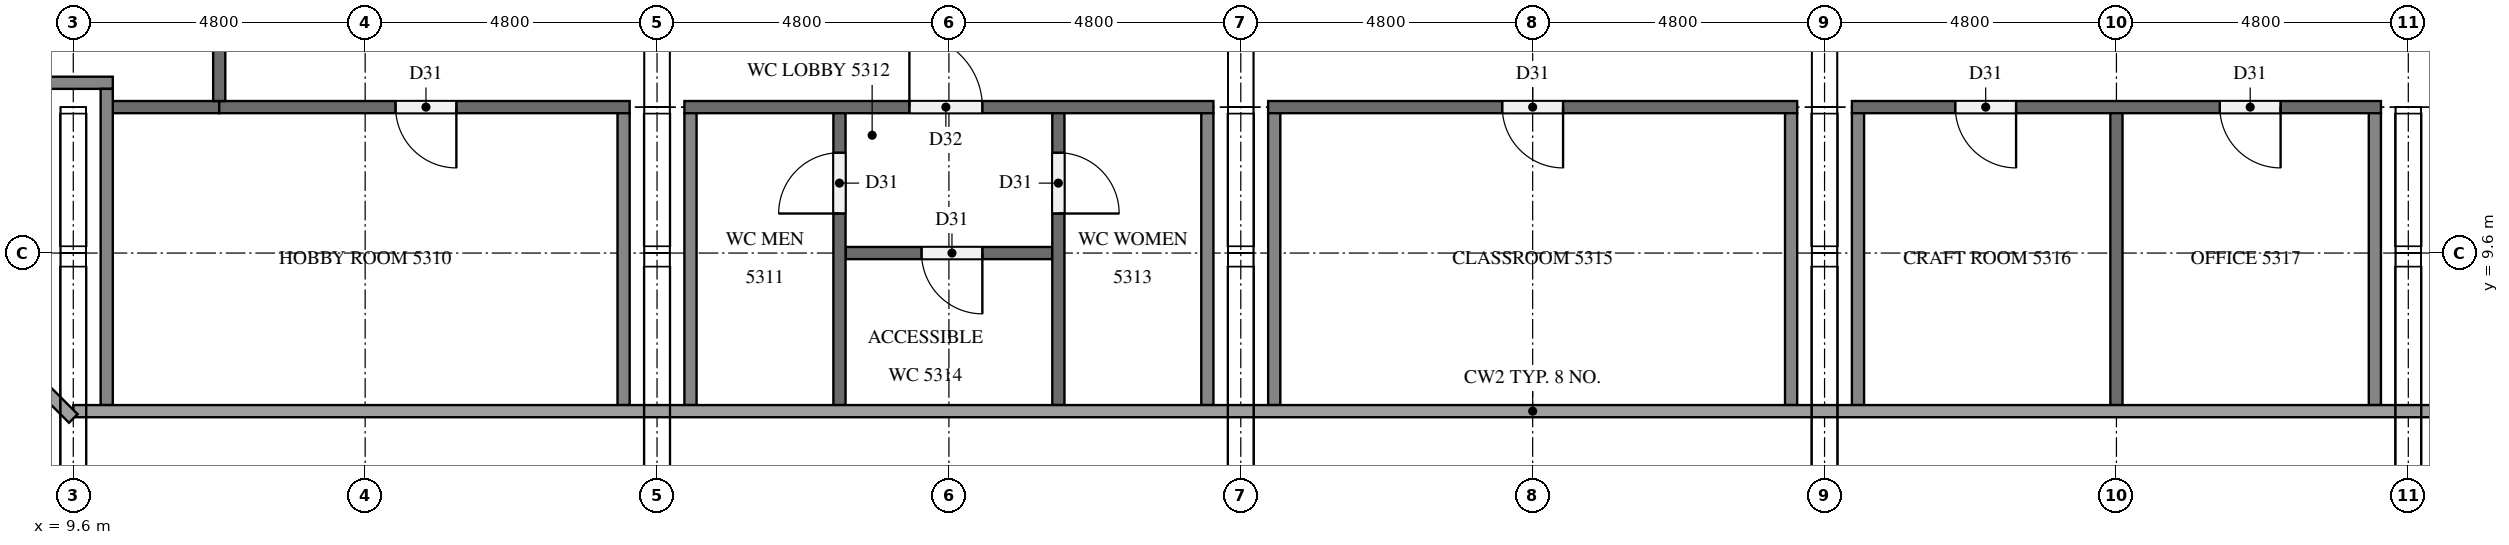
"""IFC4 building model, lengths in metres.
Left out: names, types, materials, properties, quantities, classifications, styles, units other than length and angle.
Written with IfcOpenShell. Run it as: python <this file> out.ifc"""

import sys

from ifc_helpers import new_model, si_unit, direction, frame, frame_2d, origin, place, context, subcontext, project, spatial, rectangle, extrude, element, fill, save


model = new_model("IFC4")
c1 = context("Model", 3, precision=1e-05, world=origin(), true_north=direction((0.0, 1.0)))
c2 = subcontext(c1, "Body", "Model", "MODEL_VIEW")
j1 = project(units=[si_unit("LENGTHUNIT", "METRE"), si_unit("PLANEANGLEUNIT", "RADIAN")], contexts=[c1])
p1 = place(None, origin())
s1 = spatial("IfcSite", under=j1, at=p1, CompositionType="ELEMENT")
p2 = place(p1, origin())
s2 = spatial("IfcBuilding", under=s1, at=p2, CompositionType="ELEMENT")
p3 = place(p2, frame((0.0, 0.0, 203.4)))
s3 = spatial("IfcBuildingStorey", under=s2, at=p3, CompositionType="ELEMENT", Elevation=203.4)
p4 = place(p3, frame((25.7, 9.6, 0.0), z_axis=(0.0, 0.0, 1.0), x_axis=(-1.0, 0.0, 0.0)))
e1 = element("IfcWall", 1, at=p4, inside=s3, PredefinedType="PARTITIONING", context=c2, shape_type="SweptSolid", body=[
    extrude(rectangle(XDim=3.4, YDim=0.2, at=frame_2d((1.7, 0.0))), origin(), (0.0, 0.0, 1.0), 5.1),
])
p5 = place(p4, frame((1.15, 0.0, 0.0)))
e2 = element("IfcOpeningElement", 2, at=p5, cuts=e1, PredefinedType="OPENING", context=c2, shape_type="SweptSolid", body=[
    extrude(rectangle(XDim=1.0, YDim=2.1, at=frame_2d((0.5, 1.05))), frame((0.0, 0.11, 0.0), z_axis=(0.0, -1.0, 0.0), x_axis=(1.0, 0.0, 0.0)), (0.0, 0.0, 1.0), 0.22),
])
p6 = place(p3, frame((10.25, 12.0, 0.0), z_axis=(0.0, 0.0, 1.0), x_axis=(1.0, 0.0, 0.0)))
e3 = element("IfcWall", 3, at=p6, inside=s3, PredefinedType="PARTITIONING", context=c2, shape_type="SweptSolid", body=[
    extrude(rectangle(XDim=1.75, YDim=0.2, at=frame_2d((0.875, 0.0))), origin(), (0.0, 0.0, 1.0), 5.1),
])
p7 = place(p3, frame((18.75, 12.0, 0.0), z_axis=(0.0, 0.0, 1.0), x_axis=(-1.0, 0.0, 0.0)))
e4 = element("IfcWall", 4, at=p7, inside=s3, PredefinedType="PARTITIONING", context=c2, shape_type="SweptSolid", body=[
    extrude(rectangle(XDim=6.75, YDim=0.2, at=frame_2d((3.375, 0.0))), origin(), (0.0, 0.0, 1.0), 5.1),
])
p8 = place(p7, frame((2.85, 0.0, 0.0)))
e5 = element("IfcOpeningElement", 5, at=p8, cuts=e4, PredefinedType="OPENING", context=c2, shape_type="SweptSolid", body=[
    extrude(rectangle(XDim=1.0, YDim=2.1, at=frame_2d((0.5, 1.05))), frame((0.0, 0.11, 0.0), z_axis=(0.0, -1.0, 0.0), x_axis=(1.0, 0.0, 0.0)), (0.0, 0.0, 1.0), 0.22),
])
p9 = place(p3, frame((19.65, 12.0, 0.0), z_axis=(0.0, 0.0, 1.0), x_axis=(1.0, 0.0, 0.0)))
e6 = element("IfcWall", 6, at=p9, inside=s3, PredefinedType="PARTITIONING", context=c2, shape_type="SweptSolid", body=[
    extrude(rectangle(XDim=8.7, YDim=0.2, at=frame_2d((4.35, 0.0))), origin(), (0.0, 0.0, 1.0), 5.1),
])
p10 = place(p9, frame((3.7, 0.0, 0.0)))
e7 = element("IfcOpeningElement", 7, at=p10, cuts=e6, PredefinedType="OPENING", context=c2, shape_type="SweptSolid", body=[
    extrude(rectangle(XDim=1.2, YDim=2.1, at=frame_2d((0.6, 1.05))), frame((0.0, 0.11, 0.0), z_axis=(0.0, -1.0, 0.0), x_axis=(1.0, 0.0, 0.0)), (0.0, 0.0, 1.0), 0.22),
])
p11 = place(p3, frame((37.95, 12.0, 0.0), z_axis=(0.0, 0.0, 1.0), x_axis=(-1.0, 0.0, 0.0)))
e8 = element("IfcWall", 8, at=p11, inside=s3, PredefinedType="PARTITIONING", context=c2, shape_type="SweptSolid", body=[
    extrude(rectangle(XDim=8.7, YDim=0.2, at=frame_2d((4.35, 0.0))), origin(), (0.0, 0.0, 1.0), 5.1),
])
p12 = place(p11, frame((3.85, 0.0, 0.0)))
e9 = element("IfcOpeningElement", 9, at=p12, cuts=e8, PredefinedType="OPENING", context=c2, shape_type="SweptSolid", body=[
    extrude(rectangle(XDim=1.0, YDim=2.1, at=frame_2d((0.5, 1.05))), frame((0.0, 0.11, 0.0), z_axis=(0.0, -1.0, 0.0), x_axis=(1.0, 0.0, 0.0)), (0.0, 0.0, 1.0), 0.22),
])
p13 = place(p3, frame((47.55, 12.0, 0.0), z_axis=(0.0, 0.0, 1.0), x_axis=(-1.0, 0.0, 0.0)))
e10 = element("IfcWall", 10, at=p13, inside=s3, PredefinedType="PARTITIONING", context=c2, shape_type="SweptSolid", body=[
    extrude(rectangle(XDim=8.7, YDim=0.2, at=frame_2d((4.35, 0.0))), origin(), (0.0, 0.0, 1.0), 5.1),
])
p14 = place(p13, frame((6.0, 0.0, 0.0)))
e11 = element("IfcOpeningElement", 11, at=p14, cuts=e10, PredefinedType="OPENING", context=c2, shape_type="SweptSolid", body=[
    extrude(rectangle(XDim=1.0, YDim=2.1, at=frame_2d((0.5, 1.05))), frame((0.0, 0.11, 0.0), z_axis=(0.0, -1.0, 0.0), x_axis=(1.0, 0.0, 0.0)), (0.0, 0.0, 1.0), 0.22),
])
p15 = place(p13, frame((1.65, 0.0, 0.0)))
e12 = element("IfcOpeningElement", 12, at=p15, cuts=e10, PredefinedType="OPENING", context=c2, shape_type="SweptSolid", body=[
    extrude(rectangle(XDim=1.0, YDim=2.1, at=frame_2d((0.5, 1.05))), frame((0.0, 0.11, 0.0), z_axis=(0.0, -1.0, 0.0), x_axis=(1.0, 0.0, 0.0)), (0.0, 0.0, 1.0), 0.22),
])
p16 = place(p3, frame((8.95, 12.4, 0.0), z_axis=(0.0, 0.0, 1.0), x_axis=(1.0, 0.0, 0.0)))
e13 = element("IfcWall", 13, at=p16, inside=s3, PredefinedType="PARTITIONING", context=c2, shape_type="SweptSolid", body=[
    extrude(rectangle(XDim=1.3, YDim=0.2, at=frame_2d((0.65, 0.0))), origin(), (0.0, 0.0, 1.0), 5.1),
])
p17 = place(p3, frame((10.15, 7.1, 0.0), z_axis=(0.0, 0.0, 1.0), x_axis=(0.0, 1.0, 0.0)))
e14 = element("IfcWall", 14, at=p17, inside=s3, PredefinedType="PARTITIONING", context=c2, shape_type="SweptSolid", body=[
    extrude(rectangle(XDim=5.2, YDim=0.2, at=frame_2d((2.6, 0.0))), origin(), (0.0, 0.0, 1.0), 5.1),
])
p18 = place(p3, frame((12.0, 12.1, 0.0), z_axis=(0.0, 0.0, 1.0), x_axis=(0.0, 1.0, 0.0)))
e15 = element("IfcWall", 15, at=p18, inside=s3, PredefinedType="PARTITIONING", context=c2, shape_type="SweptSolid", body=[
    extrude(rectangle(XDim=28.6, YDim=0.2, at=frame_2d((14.3, 0.0))), origin(), (0.0, 0.0, 1.0), 5.1),
])
p19 = place(p18, frame((3.05, 0.0, 0.0)))
e16 = element("IfcOpeningElement", 16, at=p19, cuts=e15, PredefinedType="OPENING", context=c2, shape_type="SweptSolid", body=[
    extrude(rectangle(XDim=1.0, YDim=2.1, at=frame_2d((0.5, 1.05))), frame((0.0, 0.11, 0.0), z_axis=(0.0, -1.0, 0.0), x_axis=(1.0, 0.0, 0.0)), (0.0, 0.0, 1.0), 0.22),
])
p20 = place(p18, frame((9.05, 0.0, 0.0)))
e17 = element("IfcOpeningElement", 17, at=p20, cuts=e15, PredefinedType="OPENING", context=c2, shape_type="SweptSolid", body=[
    extrude(rectangle(XDim=1.0, YDim=2.1, at=frame_2d((0.5, 1.05))), frame((0.0, 0.11, 0.0), z_axis=(0.0, -1.0, 0.0), x_axis=(1.0, 0.0, 0.0)), (0.0, 0.0, 1.0), 0.22),
])
p21 = place(p18, frame((16.25, 0.0, 0.0)))
e18 = element("IfcOpeningElement", 18, at=p21, cuts=e15, PredefinedType="OPENING", context=c2, shape_type="SweptSolid", body=[
    extrude(rectangle(XDim=1.0, YDim=2.1, at=frame_2d((0.5, 1.05))), frame((0.0, 0.11, 0.0), z_axis=(0.0, -1.0, 0.0), x_axis=(1.0, 0.0, 0.0)), (0.0, 0.0, 1.0), 0.22),
])
p22 = place(p18, frame((24.55, 0.0, 0.0)))
e19 = element("IfcOpeningElement", 19, at=p22, cuts=e15, PredefinedType="OPENING", context=c2, shape_type="SweptSolid", body=[
    extrude(rectangle(XDim=1.0, YDim=2.1, at=frame_2d((0.5, 1.05))), frame((0.0, 0.11, 0.0), z_axis=(0.0, -1.0, 0.0), x_axis=(1.0, 0.0, 0.0)), (0.0, 0.0, 1.0), 0.22),
])
for number, where, z_axis, x_axis in (
    (20, (18.65, 7.1, 0.0), (0.0, 0.0, 1.0), (0.0, 1.0, 0.0)),
    (21, (19.75, 7.1, 0.0), (0.0, 0.0, 1.0), (0.0, 1.0, 0.0)),
):
    element("IfcWall", number, at=place(p3, frame(where, z_axis=z_axis, x_axis=x_axis)), inside=s3, PredefinedType="PARTITIONING", context=c2, shape_type="SweptSolid", body=[
        extrude(rectangle(XDim=4.8, YDim=0.2, at=frame_2d((2.4, 0.0))), origin(), (0.0, 0.0, 1.0), 5.1),
    ])
p23 = place(p3, frame((22.2, 7.1, 0.0), z_axis=(0.0, 0.0, 1.0), x_axis=(0.0, 1.0, 0.0)))
e22 = element("IfcWall", 22, at=p23, inside=s3, PredefinedType="PARTITIONING", context=c2, shape_type="SweptSolid", body=[
    extrude(rectangle(XDim=4.8, YDim=0.2, at=frame_2d((2.4, 0.0))), origin(), (0.0, 0.0, 1.0), 5.1),
])
p24 = place(p23, frame((3.15, 0.0, 0.0)))
e23 = element("IfcOpeningElement", 23, at=p24, cuts=e22, PredefinedType="OPENING", context=c2, shape_type="SweptSolid", body=[
    extrude(rectangle(XDim=1.0, YDim=2.1, at=frame_2d((0.5, 1.05))), frame((0.0, 0.11, 0.0), z_axis=(0.0, -1.0, 0.0), x_axis=(1.0, 0.0, 0.0)), (0.0, 0.0, 1.0), 0.22),
])
p25 = place(p3, frame((25.8, 11.9, 0.0), z_axis=(0.0, 0.0, 1.0), x_axis=(0.0, -1.0, 0.0)))
e24 = element("IfcWall", 24, at=p25, inside=s3, PredefinedType="PARTITIONING", context=c2, shape_type="SweptSolid", body=[
    extrude(rectangle(XDim=4.8, YDim=0.2, at=frame_2d((2.4, 0.0))), origin(), (0.0, 0.0, 1.0), 5.1),
])
p26 = place(p25, frame((0.65, 0.0, 0.0)))
e25 = element("IfcOpeningElement", 25, at=p26, cuts=e24, PredefinedType="OPENING", context=c2, shape_type="SweptSolid", body=[
    extrude(rectangle(XDim=1.0, YDim=2.1, at=frame_2d((0.5, 1.05))), frame((0.0, 0.11, 0.0), z_axis=(0.0, -1.0, 0.0), x_axis=(1.0, 0.0, 0.0)), (0.0, 0.0, 1.0), 0.22),
])
for number, where, z_axis, x_axis in (
    (26, (28.25, 7.1, 0.0), (0.0, 0.0, 1.0), (0.0, 1.0, 0.0)),
    (27, (29.35, 7.1, 0.0), (0.0, 0.0, 1.0), (0.0, 1.0, 0.0)),
    (28, (37.85, 7.1, 0.0), (0.0, 0.0, 1.0), (0.0, 1.0, 0.0)),
    (29, (38.95, 7.1, 0.0), (0.0, 0.0, 1.0), (0.0, 1.0, 0.0)),
    (30, (43.2, 7.1, 0.0), (0.0, 0.0, 1.0), (0.0, 1.0, 0.0)),
    (31, (47.45, 7.1, 0.0), (0.0, 0.0, 1.0), (0.0, 1.0, 0.0)),
):
    element("IfcWall", number, at=place(p3, frame(where, z_axis=z_axis, x_axis=x_axis)), inside=s3, PredefinedType="PARTITIONING", context=c2, shape_type="SweptSolid", body=[
        extrude(rectangle(XDim=4.8, YDim=0.2, at=frame_2d((2.4, 0.0))), origin(), (0.0, 0.0, 1.0), 5.1),
    ])
p27 = place(p8, origin())
e32 = element("IfcDoor", 32, at=p27, inside=s3, OperationType="SINGLE_SWING_LEFT", PredefinedType="DOOR", context=c2, shape_type="SweptSolid", body=[
    extrude(rectangle(XDim=1.0, YDim=2.1, at=frame_2d((0.5, 1.05))), frame((0.0, 0.025, 0.0), z_axis=(0.0, -1.0, 0.0), x_axis=(1.0, 0.0, 0.0)), (0.0, 0.0, 1.0), 0.05),
])
fill(e5, e32)
p28 = place(p10, origin())
e33 = element("IfcDoor", 33, at=p28, inside=s3, OperationType="SINGLE_SWING_LEFT", PredefinedType="DOOR", context=c2, shape_type="SweptSolid", body=[
    extrude(rectangle(XDim=1.2, YDim=2.1, at=frame_2d((0.6, 1.05))), frame((0.0, 0.025, 0.0), z_axis=(0.0, -1.0, 0.0), x_axis=(1.0, 0.0, 0.0)), (0.0, 0.0, 1.0), 0.05),
])
fill(e7, e33)
p29 = place(p24, origin())
e34 = element("IfcDoor", 34, at=p29, inside=s3, OperationType="SINGLE_SWING_LEFT", PredefinedType="DOOR", context=c2, shape_type="SweptSolid", body=[
    extrude(rectangle(XDim=1.0, YDim=2.1, at=frame_2d((0.5, 1.05))), frame((0.0, 0.025, 0.0), z_axis=(0.0, -1.0, 0.0), x_axis=(1.0, 0.0, 0.0)), (0.0, 0.0, 1.0), 0.05),
])
fill(e23, e34)
p30 = place(p26, origin())
e35 = element("IfcDoor", 35, at=p30, inside=s3, OperationType="SINGLE_SWING_RIGHT", PredefinedType="DOOR", context=c2, shape_type="SweptSolid", body=[
    extrude(rectangle(XDim=1.0, YDim=2.1, at=frame_2d((0.5, 1.05))), frame((0.0, 0.025, 0.0), z_axis=(0.0, -1.0, 0.0), x_axis=(1.0, 0.0, 0.0)), (0.0, 0.0, 1.0), 0.05),
])
fill(e25, e35)
p31 = place(p5, origin())
e36 = element("IfcDoor", 36, at=p31, inside=s3, OperationType="SINGLE_SWING_LEFT", PredefinedType="DOOR", context=c2, shape_type="SweptSolid", body=[
    extrude(rectangle(XDim=1.0, YDim=2.1, at=frame_2d((0.5, 1.05))), frame((0.0, 0.025, 0.0), z_axis=(0.0, -1.0, 0.0), x_axis=(1.0, 0.0, 0.0)), (0.0, 0.0, 1.0), 0.05),
])
fill(e2, e36)
p32 = place(p12, origin())
e37 = element("IfcDoor", 37, at=p32, inside=s3, OperationType="SINGLE_SWING_LEFT", PredefinedType="DOOR", context=c2, shape_type="SweptSolid", body=[
    extrude(rectangle(XDim=1.0, YDim=2.1, at=frame_2d((0.5, 1.05))), frame((0.0, 0.025, 0.0), z_axis=(0.0, -1.0, 0.0), x_axis=(1.0, 0.0, 0.0)), (0.0, 0.0, 1.0), 0.05),
])
fill(e9, e37)
p33 = place(p14, origin())
e38 = element("IfcDoor", 38, at=p33, inside=s3, OperationType="SINGLE_SWING_LEFT", PredefinedType="DOOR", context=c2, shape_type="SweptSolid", body=[
    extrude(rectangle(XDim=1.0, YDim=2.1, at=frame_2d((0.5, 1.05))), frame((0.0, 0.025, 0.0), z_axis=(0.0, -1.0, 0.0), x_axis=(1.0, 0.0, 0.0)), (0.0, 0.0, 1.0), 0.05),
])
fill(e11, e38)
p34 = place(p15, origin())
e39 = element("IfcDoor", 39, at=p34, inside=s3, OperationType="SINGLE_SWING_LEFT", PredefinedType="DOOR", context=c2, shape_type="SweptSolid", body=[
    extrude(rectangle(XDim=1.0, YDim=2.1, at=frame_2d((0.5, 1.05))), frame((0.0, 0.025, 0.0), z_axis=(0.0, -1.0, 0.0), x_axis=(1.0, 0.0, 0.0)), (0.0, 0.0, 1.0), 0.05),
])
fill(e12, e39)
save(model, sys.argv[1])
